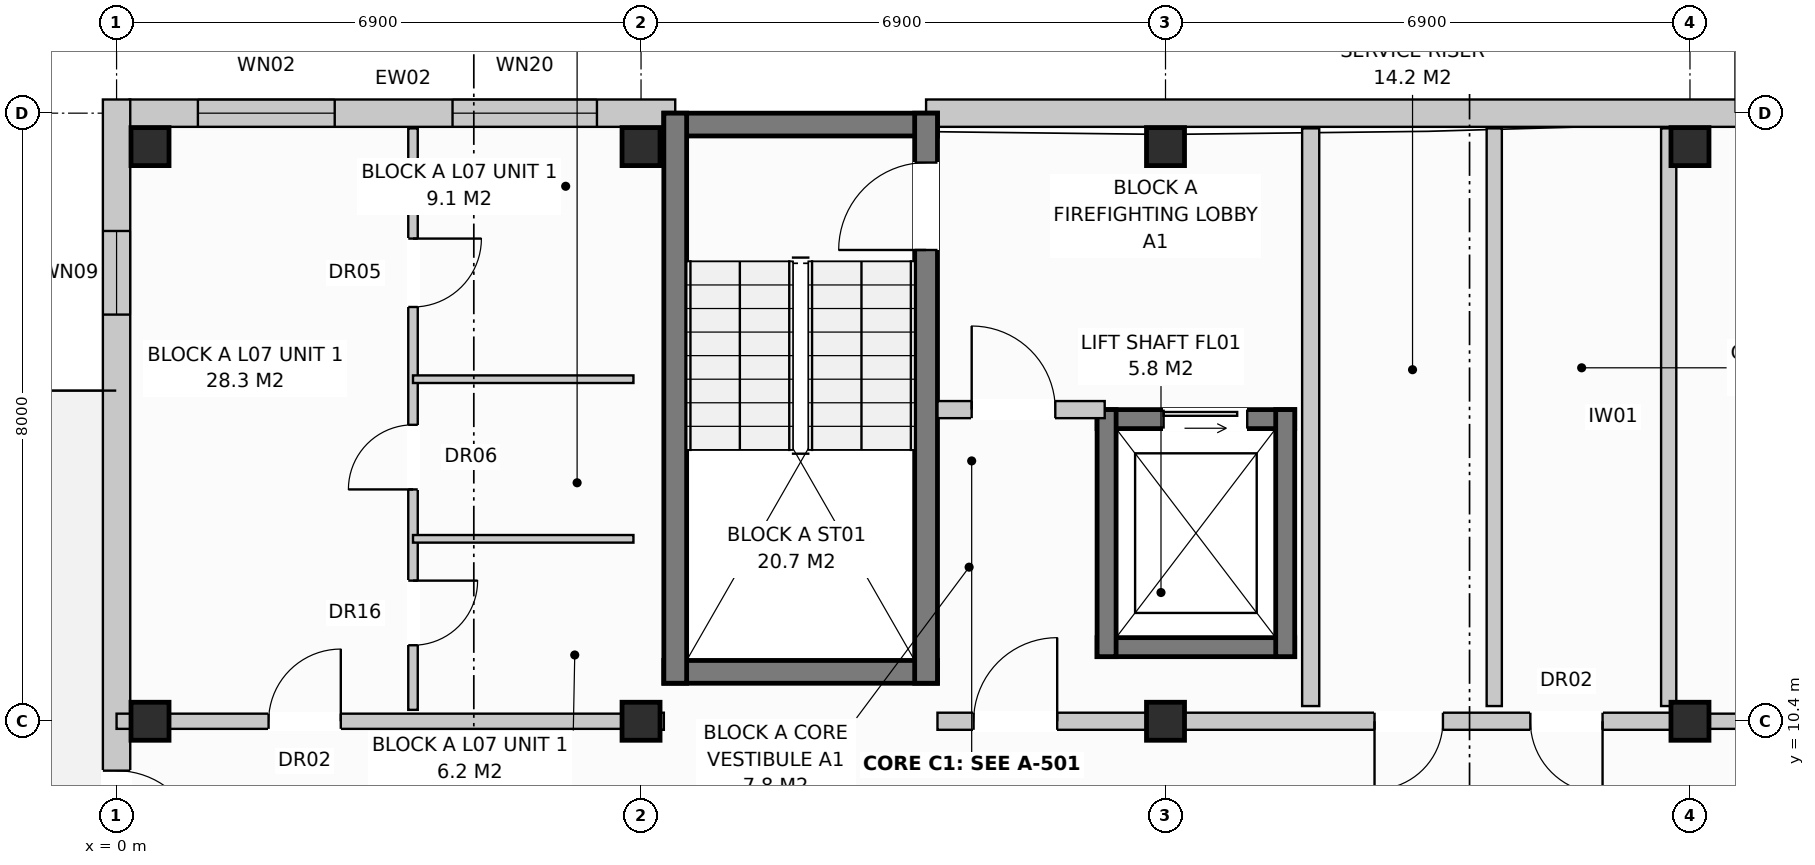
"""IFC4 building model, lengths in metres.
Left out: names, types, materials, properties, quantities, classifications, styles, units other than length and angle.
Written with IfcOpenShell. Run it as: python <this file> out.ifc"""

import sys

from ifc_helpers import new_model, si_unit, direction, frame, frame_2d, origin, origin_with_axes, origin_2d, place, context, subcontext, project, spatial, rectangle, extrude, element, fill, save


model = new_model("IFC4")
c1 = context("Model", 3, precision=1e-05, world=origin(), true_north=direction((0.0, 1.0)))
c2 = subcontext(c1, "Body", "Model", "MODEL_VIEW")
j1 = project(units=[si_unit("LENGTHUNIT", "METRE"), si_unit("PLANEANGLEUNIT", "RADIAN")], contexts=[c1])
p1 = place(None, origin())
s1 = spatial("IfcSite", under=j1, at=p1, CompositionType="ELEMENT")
p2 = place(p1, origin())
s2 = spatial("IfcBuilding", under=s1, at=p2, CompositionType="ELEMENT")
p3 = place(p2, frame((0.0, 0.0, 24.0)))
s3 = spatial("IfcBuildingStorey", under=s2, at=p3, CompositionType="ELEMENT", Elevation=24.0)
for number, where, z_axis, x_axis in (
    (1, (0.44, 10.4, 0.0), (0.0, 0.0, 1.0), (1.0, 0.0, 0.0)),
    (2, (0.44, 17.96, 0.0), (0.0, 0.0, 1.0), (1.0, 0.0, 0.0)),
    (3, (6.9, 10.4, 0.0), (0.0, 0.0, 1.0), (1.0, 0.0, 0.0)),
    (4, (6.9, 17.96, 0.0), (0.0, 0.0, 1.0), (1.0, 0.0, 0.0)),
    (5, (13.8, 10.4, 0.0), (0.0, 0.0, 1.0), (1.0, 0.0, 0.0)),
    (6, (13.8, 17.96, 0.0), (0.0, 0.0, 1.0), (1.0, 0.0, 0.0)),
    (7, (20.7, 10.4, 0.0), (0.0, 0.0, 1.0), (1.0, 0.0, 0.0)),
    (8, (20.7, 17.96, 0.0), (0.0, 0.0, 1.0), (1.0, 0.0, 0.0)),
):
    element("IfcColumn", number, at=place(p3, frame(where, z_axis=z_axis, x_axis=x_axis)), inside=s3, PredefinedType="COLUMN", context=c2, shape_type="SweptSolid", body=[
        extrude(rectangle(XDim=0.5, YDim=0.5, at=origin_2d()), origin(), (0.0, 0.0, 1.0), 3.2),
    ])
p4 = place(p3, frame((0.17, 18.4, 0.0), z_axis=(0.0, 0.0, 1.0), x_axis=(1.0, 0.0, 0.0)))
e9 = element("IfcWall", 9, at=p4, inside=s3, PredefinedType="STANDARD", context=c2, shape_type="SweptSolid", body=[
    extrude(rectangle(XDim=7.18, YDim=0.36, at=frame_2d((3.59, 0.0))), origin(), (0.0, 0.0, 1.0), 2.95),
])
p5 = place(p4, frame((0.9, 0.0, 0.8)))
e10 = element("IfcOpeningElement", 10, at=p5, cuts=e9, PredefinedType="OPENING", context=c2, shape_type="SweptSolid", body=[
    extrude(rectangle(XDim=1.8, YDim=1.7, at=frame_2d((0.9, 0.85))), frame((0.0, 0.192, 0.0), z_axis=(0.0, -1.0, 0.0), x_axis=(1.0, 0.0, 0.0)), (0.0, 0.0, 1.0), 0.384),
])
p6 = place(p4, frame((4.25, 0.0, 0.8)))
e11 = element("IfcOpeningElement", 11, at=p6, cuts=e9, PredefinedType="OPENING", context=c2, shape_type="SweptSolid", body=[
    extrude(rectangle(XDim=1.9, YDim=1.85, at=frame_2d((0.95, 0.925))), frame((0.0, 0.192, 0.0), z_axis=(0.0, -1.0, 0.0), x_axis=(1.0, 0.0, 0.0)), (0.0, 0.0, 1.0), 0.384),
])
p7 = place(p3, frame((10.65, 18.4, 0.0), z_axis=(0.0, 0.0, 1.0), x_axis=(1.0, 0.0, 0.0)))
e12 = element("IfcWall", 12, at=p7, inside=s3, PredefinedType="STANDARD", context=c2, shape_type="SweptSolid", body=[
    extrude(rectangle(XDim=17.4, YDim=0.36, at=frame_2d((8.7, 0.0))), origin(), (0.0, 0.0, 1.0), 2.95),
])
p8 = place(p7, frame((11.87, 0.0, 0.0)))
e13 = element("IfcOpeningElement", 13, at=p8, cuts=e12, PredefinedType="OPENING", context=c2, shape_type="SweptSolid", body=[
    extrude(rectangle(XDim=0.95, YDim=2.1, at=frame_2d((0.475, 1.05))), frame((0.0, 0.192, 0.0), z_axis=(0.0, -1.0, 0.0), x_axis=(1.0, 0.0, 0.0)), (0.0, 0.0, 1.0), 0.384),
])
p9 = place(p7, frame((14.87, 0.0, 0.72)))
e14 = element("IfcOpeningElement", 14, at=p9, cuts=e12, PredefinedType="OPENING", context=c2, shape_type="SweptSolid", body=[
    extrude(rectangle(XDim=1.1, YDim=1.5, at=frame_2d((0.55, 0.75))), frame((0.0, 0.192, 0.0), z_axis=(0.0, -1.0, 0.0), x_axis=(1.0, 0.0, 0.0)), (0.0, 0.0, 1.0), 0.384),
])
p10 = place(p3, frame((0.0, -0.18, 0.0), z_axis=(0.0, 0.0, 1.0), x_axis=(0.0, 1.0, 0.0)))
e15 = element("IfcWall", 15, at=p10, inside=s3, PredefinedType="STANDARD", context=c2, shape_type="SweptSolid", body=[
    extrude(rectangle(XDim=18.76, YDim=0.36, at=frame_2d((9.38, 0.0))), origin(), (0.0, 0.0, 1.0), 2.95),
])
p11 = place(p10, frame((8.83, 0.0, 0.0)))
e16 = element("IfcOpeningElement", 16, at=p11, cuts=e15, PredefinedType="OPENING", context=c2, shape_type="SweptSolid", body=[
    extrude(rectangle(XDim=1.1, YDim=2.1, at=frame_2d((0.55, 1.05))), frame((0.0, 0.192, 0.0), z_axis=(0.0, -1.0, 0.0), x_axis=(1.0, 0.0, 0.0)), (0.0, 0.0, 1.0), 0.384),
])
p12 = place(p10, frame((1.73, 0.0, 0.72)))
e17 = element("IfcOpeningElement", 17, at=p12, cuts=e15, PredefinedType="OPENING", context=c2, shape_type="SweptSolid", body=[
    extrude(rectangle(XDim=1.1, YDim=1.5, at=frame_2d((0.55, 0.75))), frame((0.0, 0.192, 0.0), z_axis=(0.0, -1.0, 0.0), x_axis=(1.0, 0.0, 0.0)), (0.0, 0.0, 1.0), 0.384),
])
p13 = place(p10, frame((15.93, 0.0, 0.72)))
e18 = element("IfcOpeningElement", 18, at=p13, cuts=e15, PredefinedType="OPENING", context=c2, shape_type="SweptSolid", body=[
    extrude(rectangle(XDim=1.1, YDim=1.5, at=frame_2d((0.55, 0.75))), frame((0.0, 0.192, 0.0), z_axis=(0.0, -1.0, 0.0), x_axis=(1.0, 0.0, 0.0)), (0.0, 0.0, 1.0), 0.384),
])
for number, where, z_axis, x_axis in (
    (19, (7.2, 18.25, 0.0), (0.0, 0.0, 1.0), (1.0, 0.0, 0.0)),
    (20, (7.2, 11.05, 0.0), (0.0, 0.0, 1.0), (1.0, 0.0, 0.0)),
):
    element("IfcWall", number, at=place(p3, frame(where, z_axis=z_axis, x_axis=x_axis)), inside=s3, PredefinedType="SHEAR", context=c2, shape_type="SweptSolid", body=[
        extrude(rectangle(XDim=3.6, YDim=0.3, at=frame_2d((1.8, 0.0))), origin(), (0.0, 0.0, 1.0), 2.95),
    ])
p14 = place(p3, frame((7.35, 10.9, 0.0), z_axis=(0.0, 0.0, 1.0), x_axis=(0.0, 1.0, 0.0)))
e21 = element("IfcWall", 21, at=p14, inside=s3, PredefinedType="SHEAR", context=c2, shape_type="SweptSolid", body=[
    extrude(rectangle(XDim=7.5, YDim=0.3, at=frame_2d((3.75, 0.0))), origin(), (0.0, 0.0, 1.0), 2.95),
])
p15 = place(p3, frame((10.65, 10.9, 0.0), z_axis=(0.0, 0.0, 1.0), x_axis=(0.0, 1.0, 0.0)))
e22 = element("IfcWall", 22, at=p15, inside=s3, PredefinedType="SHEAR", context=c2, shape_type="SweptSolid", body=[
    extrude(rectangle(XDim=7.5, YDim=0.3, at=frame_2d((3.75, 0.0))), origin(), (0.0, 0.0, 1.0), 2.95),
])
p16 = place(p15, frame((5.7, 0.0, 0.0)))
e23 = element("IfcOpeningElement", 23, at=p16, cuts=e22, PredefinedType="OPENING", context=c2, shape_type="SweptSolid", body=[
    extrude(rectangle(XDim=1.15, YDim=2.15, at=frame_2d((0.575, 1.075))), frame((0.0, 0.162, 0.0), z_axis=(0.0, -1.0, 0.0), x_axis=(1.0, 0.0, 0.0)), (0.0, 0.0, 1.0), 0.324),
])
p17 = place(p3, frame((12.9, 14.375, 0.0), z_axis=(0.0, 0.0, 1.0), x_axis=(1.0, 0.0, 0.0)))
e24 = element("IfcWall", 24, at=p17, inside=s3, PredefinedType="SHEAR", context=c2, shape_type="SweptSolid", body=[
    extrude(rectangle(XDim=2.6, YDim=0.25, at=frame_2d((1.3, 0.0))), origin(), (0.0, 0.0, 1.0), 2.95),
])
p18 = place(p17, frame((0.875, 0.0, 0.0)))
e25 = element("IfcOpeningElement", 25, at=p18, cuts=e24, PredefinedType="OPENING", context=c2, shape_type="SweptSolid", body=[
    extrude(rectangle(XDim=1.1, YDim=2.1, at=frame_2d((0.55, 1.05))), frame((0.0, 0.137, 0.0), z_axis=(0.0, -1.0, 0.0), x_axis=(1.0, 0.0, 0.0)), (0.0, 0.0, 1.0), 0.274),
])
p19 = place(p3, frame((12.9, 11.375, 0.0), z_axis=(0.0, 0.0, 1.0), x_axis=(1.0, 0.0, 0.0)))
e26 = element("IfcWall", 26, at=p19, inside=s3, PredefinedType="SHEAR", context=c2, shape_type="SweptSolid", body=[
    extrude(rectangle(XDim=2.6, YDim=0.25, at=frame_2d((1.3, 0.0))), origin(), (0.0, 0.0, 1.0), 2.95),
])
for number, where, z_axis, x_axis in (
    (27, (13.025, 11.25, 0.0), (0.0, 0.0, 1.0), (0.0, 1.0, 0.0)),
    (28, (15.375, 11.25, 0.0), (0.0, 0.0, 1.0), (0.0, 1.0, 0.0)),
):
    element("IfcWall", number, at=place(p3, frame(where, z_axis=z_axis, x_axis=x_axis)), inside=s3, PredefinedType="SHEAR", context=c2, shape_type="SweptSolid", body=[
        extrude(rectangle(XDim=3.25, YDim=0.25, at=frame_2d((1.625, 0.0))), origin(), (0.0, 0.0, 1.0), 2.95),
    ])
p20 = place(p3, frame((15.71, 10.6, 0.0), z_axis=(0.0, 0.0, 1.0), x_axis=(0.0, 1.0, 0.0)))
e29 = element("IfcWall", 29, at=p20, inside=s3, PredefinedType="PARTITIONING", context=c2, shape_type="SweptSolid", body=[
    extrude(rectangle(XDim=7.6, YDim=0.225, at=frame_2d((3.8, 0.0))), origin(), (0.0, 0.0, 1.0), 2.59),
])
p21 = place(p3, frame((10.8, 14.5, 0.0), z_axis=(0.0, 0.0, 1.0), x_axis=(1.0, 0.0, 0.0)))
e30 = element("IfcWall", 30, at=p21, inside=s3, PredefinedType="PARTITIONING", context=c2, shape_type="SweptSolid", body=[
    extrude(rectangle(XDim=2.2, YDim=0.225, at=frame_2d((1.1, 0.0))), origin(), (0.0, 0.0, 1.0), 2.95),
])
p22 = place(p21, frame((0.45, 0.0, 0.0)))
e31 = element("IfcOpeningElement", 31, at=p22, cuts=e30, PredefinedType="OPENING", context=c2, shape_type="SweptSolid", body=[
    extrude(rectangle(XDim=1.1, YDim=2.15, at=frame_2d((0.55, 1.075))), frame((0.0, 0.125, 0.0), z_axis=(0.0, -1.0, 0.0), x_axis=(1.0, 0.0, 0.0)), (0.0, 0.0, 1.0), 0.249),
])
p23 = place(p3, frame((6.9, 10.4, 0.0), z_axis=(0.0, 0.0, 1.0), x_axis=(1.0, 0.0, 0.0)))
e32 = element("IfcWall", 32, at=p23, inside=s3, PredefinedType="PARTITIONING", context=c2, shape_type="SweptSolid", body=[
    extrude(rectangle(XDim=0.3, YDim=0.225, at=frame_2d((0.15, 0.0))), origin(), (0.0, 0.0, 1.0), 2.95),
])
for number, where, z_axis, x_axis in (
    (33, (18.125, 10.6, 0.0), (0.0, 0.0, 1.0), (0.0, 1.0, 0.0)),
    (34, (20.42, 10.6, 0.0), (0.0, 0.0, 1.0), (0.0, 1.0, 0.0)),
):
    element("IfcWall", number, at=place(p3, frame(where, z_axis=z_axis, x_axis=x_axis)), inside=s3, PredefinedType="PARTITIONING", context=c2, shape_type="SweptSolid", body=[
        extrude(rectangle(XDim=7.6, YDim=0.2, at=frame_2d((3.8, 0.0))), origin(), (0.0, 0.0, 1.0), 2.95),
    ])
p24 = place(p3, frame((10.8, 10.4, 0.0), z_axis=(0.0, 0.0, 1.0), x_axis=(1.0, 0.0, 0.0)))
e35 = element("IfcWall", 35, at=p24, inside=s3, PredefinedType="PARTITIONING", context=c2, shape_type="SweptSolid", body=[
    extrude(rectangle(XDim=9.9, YDim=0.225, at=frame_2d((4.95, 0.0))), origin(), (0.0, 0.0, 1.0), 2.39),
])
p25 = place(p24, frame((0.475, 0.0, 0.0)))
e36 = element("IfcOpeningElement", 36, at=p25, cuts=e35, PredefinedType="OPENING", context=c2, shape_type="SweptSolid", body=[
    extrude(rectangle(XDim=1.1, YDim=2.15, at=frame_2d((0.55, 1.075))), frame((0.0, 0.125, 0.0), z_axis=(0.0, -1.0, 0.0), x_axis=(1.0, 0.0, 0.0)), (0.0, 0.0, 1.0), 0.249),
])
p26 = place(p24, frame((5.75, 0.0, 0.0)))
e37 = element("IfcOpeningElement", 37, at=p26, cuts=e35, PredefinedType="OPENING", context=c2, shape_type="SweptSolid", body=[
    extrude(rectangle(XDim=0.9, YDim=2.1, at=frame_2d((0.45, 1.05))), frame((0.0, 0.125, 0.0), z_axis=(0.0, -1.0, 0.0), x_axis=(1.0, 0.0, 0.0)), (0.0, 0.0, 1.0), 0.249),
])
p27 = place(p24, frame((7.8, 0.0, 0.0)))
e38 = element("IfcOpeningElement", 38, at=p27, cuts=e35, PredefinedType="OPENING", context=c2, shape_type="SweptSolid", body=[
    extrude(rectangle(XDim=0.95, YDim=2.15, at=frame_2d((0.475, 1.075))), frame((0.0, 0.125, 0.0), z_axis=(0.0, -1.0, 0.0), x_axis=(1.0, 0.0, 0.0)), (0.0, 0.0, 1.0), 0.249),
])
p28 = place(p3, frame((0.0, 10.4, 0.0), z_axis=(0.0, 0.0, 1.0), x_axis=(1.0, 0.0, 0.0)))
e39 = element("IfcWall", 39, at=p28, inside=s3, PredefinedType="PARTITIONING", context=c2, shape_type="SweptSolid", body=[
    extrude(rectangle(XDim=6.9, YDim=0.2, at=frame_2d((3.45, 0.0))), origin(), (0.0, 0.0, 1.0), 2.39),
])
p29 = place(p28, frame((2.0, 0.0, 0.0)))
e40 = element("IfcOpeningElement", 40, at=p29, cuts=e39, PredefinedType="OPENING", context=c2, shape_type="SweptSolid", body=[
    extrude(rectangle(XDim=0.95, YDim=2.15, at=frame_2d((0.475, 1.075))), frame((0.0, 0.112, 0.0), z_axis=(0.0, -1.0, 0.0), x_axis=(1.0, 0.0, 0.0)), (0.0, 0.0, 1.0), 0.224),
])
p30 = place(p3, frame((3.9, 10.55, 0.0), z_axis=(0.0, 0.0, 1.0), x_axis=(0.0, 1.0, 0.0)))
e41 = element("IfcWall", 41, at=p30, inside=s3, PredefinedType="PARTITIONING", context=c2, shape_type="SweptSolid", body=[
    extrude(rectangle(XDim=7.65, YDim=0.125, at=frame_2d((3.825, 0.0))), origin(), (0.0, 0.0, 1.0), 2.95),
])
p31 = place(p30, frame((0.85, 0.0, 0.0)))
e42 = element("IfcOpeningElement", 42, at=p31, cuts=e41, PredefinedType="OPENING", context=c2, shape_type="SweptSolid", body=[
    extrude(rectangle(XDim=0.85, YDim=2.1, at=frame_2d((0.425, 1.05))), frame((0.0, 0.074, 0.0), z_axis=(0.0, -1.0, 0.0), x_axis=(1.0, 0.0, 0.0)), (0.0, 0.0, 1.0), 0.149),
])
p32 = place(p30, frame((2.9, 0.0, 0.0)))
e43 = element("IfcOpeningElement", 43, at=p32, cuts=e41, PredefinedType="OPENING", context=c2, shape_type="SweptSolid", body=[
    extrude(rectangle(XDim=0.85, YDim=2.05, at=frame_2d((0.425, 1.025))), frame((0.0, 0.074, 0.0), z_axis=(0.0, -1.0, 0.0), x_axis=(1.0, 0.0, 0.0)), (0.0, 0.0, 1.0), 0.149),
])
p33 = place(p30, frame((5.3, 0.0, 0.0)))
e44 = element("IfcOpeningElement", 44, at=p33, cuts=e41, PredefinedType="OPENING", context=c2, shape_type="SweptSolid", body=[
    extrude(rectangle(XDim=0.9, YDim=2.1, at=frame_2d((0.45, 1.05))), frame((0.0, 0.074, 0.0), z_axis=(0.0, -1.0, 0.0), x_axis=(1.0, 0.0, 0.0)), (0.0, 0.0, 1.0), 0.149),
])
for number, where, z_axis, x_axis in (
    (45, (3.9, 12.8, 0.0), (0.0, 0.0, 1.0), (1.0, 0.0, 0.0)),
    (46, (3.9, 14.9, 0.0), (0.0, 0.0, 1.0), (1.0, 0.0, 0.0)),
):
    element("IfcWall", number, at=place(p3, frame(where, z_axis=z_axis, x_axis=x_axis)), inside=s3, PredefinedType="PARTITIONING", context=c2, shape_type="SweptSolid", body=[
        extrude(rectangle(XDim=2.9, YDim=0.1, at=frame_2d((1.45, 0.0))), origin(), (0.0, 0.0, 1.0), 2.95),
    ])
p34 = place(p3, frame((20.7, 10.4, 0.0), z_axis=(0.0, 0.0, 1.0), x_axis=(1.0, 0.0, 0.0)))
e47 = element("IfcWall", 47, at=p34, inside=s3, PredefinedType="PARTITIONING", context=c2, shape_type="SweptSolid", body=[
    extrude(rectangle(XDim=6.9, YDim=0.2, at=frame_2d((3.45, 0.0))), origin(), (0.0, 0.0, 1.0), 2.39),
])
p35 = place(p34, frame((2.0, 0.0, 0.0)))
e48 = element("IfcOpeningElement", 48, at=p35, cuts=e47, PredefinedType="OPENING", context=c2, shape_type="SweptSolid", body=[
    extrude(rectangle(XDim=0.95, YDim=2.15, at=frame_2d((0.475, 1.075))), frame((0.0, 0.112, 0.0), z_axis=(0.0, -1.0, 0.0), x_axis=(1.0, 0.0, 0.0)), (0.0, 0.0, 1.0), 0.224),
])
p36 = place(p5, origin_with_axes())
e49 = element("IfcWindow", 49, at=p36, inside=s3, PartitioningType="SINGLE_PANEL", PredefinedType="WINDOW", context=c2, shape_type="SweptSolid", body=[
    extrude(rectangle(XDim=1.8, YDim=1.7, at=frame_2d((0.9, 0.85))), frame((0.0, 0.03, 0.0), z_axis=(0.0, -1.0, 0.0), x_axis=(1.0, 0.0, 0.0)), (0.0, 0.0, 1.0), 0.06),
])
fill(e10, e49)
p37 = place(p6, origin_with_axes())
e50 = element("IfcWindow", 50, at=p37, inside=s3, PartitioningType="SINGLE_PANEL", PredefinedType="WINDOW", context=c2, shape_type="SweptSolid", body=[
    extrude(rectangle(XDim=1.9, YDim=1.85, at=frame_2d((0.95, 0.925))), frame((0.0, 0.03, 0.0), z_axis=(0.0, -1.0, 0.0), x_axis=(1.0, 0.0, 0.0)), (0.0, 0.0, 1.0), 0.06),
])
fill(e11, e50)
p38 = place(p11, frame((1.1, 0.0, 0.0), z_axis=(0.0, 0.0, 1.0), x_axis=(-1.0, 0.0, 0.0)))
e51 = element("IfcDoor", 51, at=p38, inside=s3, OperationType="SINGLE_SWING_LEFT", PredefinedType="DOOR", context=c2, shape_type="SweptSolid", body=[
    extrude(rectangle(XDim=1.1, YDim=2.1, at=frame_2d((0.55, 1.05))), frame((0.0, 0.025, 0.0), z_axis=(0.0, -1.0, 0.0), x_axis=(1.0, 0.0, 0.0)), (0.0, 0.0, 1.0), 0.05),
])
fill(e16, e51)
p39 = place(p13, origin_with_axes())
e52 = element("IfcWindow", 52, at=p39, inside=s3, PartitioningType="SINGLE_PANEL", PredefinedType="WINDOW", context=c2, shape_type="SweptSolid", body=[
    extrude(rectangle(XDim=1.1, YDim=1.5, at=frame_2d((0.55, 0.75))), frame((0.0, 0.03, 0.0), z_axis=(0.0, -1.0, 0.0), x_axis=(1.0, 0.0, 0.0)), (0.0, 0.0, 1.0), 0.06),
])
fill(e18, e52)
p40 = place(p16, origin_with_axes())
e53 = element("IfcDoor", 53, at=p40, inside=s3, OperationType="SINGLE_SWING_LEFT", PredefinedType="DOOR", context=c2, shape_type="SweptSolid", body=[
    extrude(rectangle(XDim=1.15, YDim=2.15, at=frame_2d((0.575, 1.075))), frame((0.0, 0.025, 0.0), z_axis=(0.0, -1.0, 0.0), x_axis=(1.0, 0.0, 0.0)), (0.0, 0.0, 1.0), 0.05),
])
fill(e23, e53)
p41 = place(p18, origin_with_axes())
e54 = element("IfcDoor", 54, at=p41, inside=s3, OperationType="SLIDING_TO_LEFT", PredefinedType="DOOR", context=c2, shape_type="SweptSolid", body=[
    extrude(rectangle(XDim=1.1, YDim=2.1, at=frame_2d((0.55, 1.05))), frame((0.0, 0.025, 0.0), z_axis=(0.0, -1.0, 0.0), x_axis=(1.0, 0.0, 0.0)), (0.0, 0.0, 1.0), 0.05),
])
fill(e25, e54)
p42 = place(p22, origin_with_axes())
e55 = element("IfcDoor", 55, at=p42, inside=s3, OperationType="SINGLE_SWING_LEFT", PredefinedType="DOOR", context=c2, shape_type="SweptSolid", body=[
    extrude(rectangle(XDim=1.1, YDim=2.15, at=frame_2d((0.55, 1.075))), frame((0.0, 0.025, 0.0), z_axis=(0.0, -1.0, 0.0), x_axis=(1.0, 0.0, 0.0)), (0.0, 0.0, 1.0), 0.05),
])
fill(e31, e55)
p43 = place(p25, origin_with_axes())
e56 = element("IfcDoor", 56, at=p43, inside=s3, OperationType="SINGLE_SWING_RIGHT", PredefinedType="DOOR", context=c2, shape_type="SweptSolid", body=[
    extrude(rectangle(XDim=1.1, YDim=2.15, at=frame_2d((0.55, 1.075))), frame((0.0, 0.025, 0.0), z_axis=(0.0, -1.0, 0.0), x_axis=(1.0, 0.0, 0.0)), (0.0, 0.0, 1.0), 0.05),
])
fill(e36, e56)
p44 = place(p26, frame((0.9, 0.0, 0.0), z_axis=(0.0, 0.0, 1.0), x_axis=(-1.0, 0.0, 0.0)))
e57 = element("IfcDoor", 57, at=p44, inside=s3, OperationType="SINGLE_SWING_LEFT", PredefinedType="DOOR", context=c2, shape_type="SweptSolid", body=[
    extrude(rectangle(XDim=0.9, YDim=2.1, at=frame_2d((0.45, 1.05))), frame((0.0, 0.025, 0.0), z_axis=(0.0, -1.0, 0.0), x_axis=(1.0, 0.0, 0.0)), (0.0, 0.0, 1.0), 0.05),
])
fill(e37, e57)
p45 = place(p27, frame((0.95, 0.0, 0.0), z_axis=(0.0, 0.0, 1.0), x_axis=(-1.0, 0.0, 0.0)))
e58 = element("IfcDoor", 58, at=p45, inside=s3, OperationType="SINGLE_SWING_RIGHT", PredefinedType="DOOR", context=c2, shape_type="SweptSolid", body=[
    extrude(rectangle(XDim=0.95, YDim=2.15, at=frame_2d((0.475, 1.075))), frame((0.0, 0.025, 0.0), z_axis=(0.0, -1.0, 0.0), x_axis=(1.0, 0.0, 0.0)), (0.0, 0.0, 1.0), 0.05),
])
fill(e38, e58)
p46 = place(p29, origin_with_axes())
e59 = element("IfcDoor", 59, at=p46, inside=s3, OperationType="SINGLE_SWING_RIGHT", PredefinedType="DOOR", context=c2, shape_type="SweptSolid", body=[
    extrude(rectangle(XDim=0.95, YDim=2.15, at=frame_2d((0.475, 1.075))), frame((0.0, 0.025, 0.0), z_axis=(0.0, -1.0, 0.0), x_axis=(1.0, 0.0, 0.0)), (0.0, 0.0, 1.0), 0.05),
])
fill(e40, e59)
p47 = place(p31, frame((0.85, 0.0, 0.0), z_axis=(0.0, 0.0, 1.0), x_axis=(-1.0, 0.0, 0.0)))
e60 = element("IfcDoor", 60, at=p47, inside=s3, OperationType="SINGLE_SWING_RIGHT", PredefinedType="DOOR", context=c2, shape_type="SweptSolid", body=[
    extrude(rectangle(XDim=0.85, YDim=2.1, at=frame_2d((0.425, 1.05))), frame((0.0, 0.025, 0.0), z_axis=(0.0, -1.0, 0.0), x_axis=(1.0, 0.0, 0.0)), (0.0, 0.0, 1.0), 0.05),
])
fill(e42, e60)
p48 = place(p32, origin_with_axes())
e61 = element("IfcDoor", 61, at=p48, inside=s3, OperationType="SINGLE_SWING_LEFT", PredefinedType="DOOR", context=c2, shape_type="SweptSolid", body=[
    extrude(rectangle(XDim=0.85, YDim=2.05, at=frame_2d((0.425, 1.025))), frame((0.0, 0.025, 0.0), z_axis=(0.0, -1.0, 0.0), x_axis=(1.0, 0.0, 0.0)), (0.0, 0.0, 1.0), 0.05),
])
fill(e43, e61)
p49 = place(p33, frame((0.9, 0.0, 0.0), z_axis=(0.0, 0.0, 1.0), x_axis=(-1.0, 0.0, 0.0)))
e62 = element("IfcDoor", 62, at=p49, inside=s3, OperationType="SINGLE_SWING_RIGHT", PredefinedType="DOOR", context=c2, shape_type="SweptSolid", body=[
    extrude(rectangle(XDim=0.9, YDim=2.1, at=frame_2d((0.45, 1.05))), frame((0.0, 0.025, 0.0), z_axis=(0.0, -1.0, 0.0), x_axis=(1.0, 0.0, 0.0)), (0.0, 0.0, 1.0), 0.05),
])
fill(e44, e62)
save(model, sys.argv[1])
